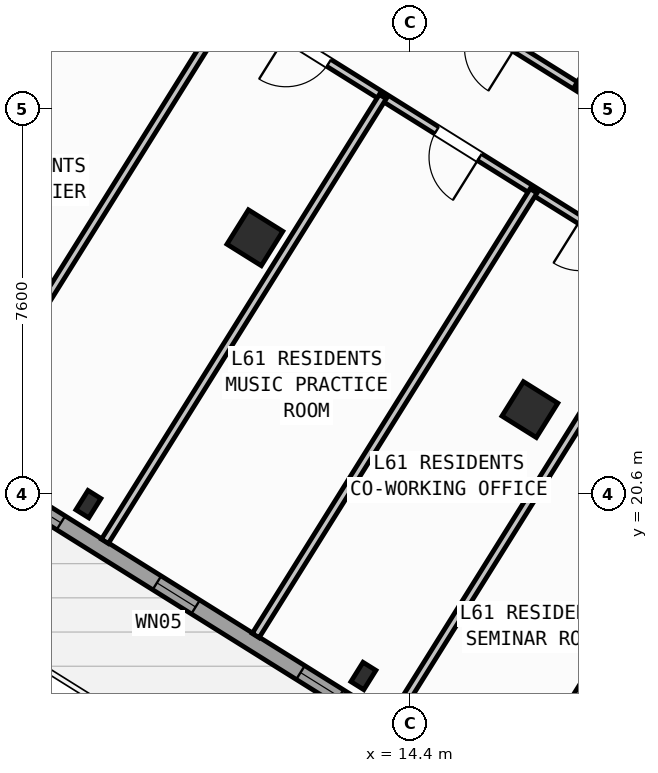
"""IFC4 building model, lengths in metres.
Left out: names, types, materials, properties, quantities, classifications, styles, units other than length and angle.
Written with IfcOpenShell. Run it as: python <this file> out.ifc"""

import sys

from ifc_helpers import new_model, si_unit, direction, frame, frame_2d, origin, origin_2d, place, context, subcontext, project, spatial, rectangle, hollow_rectangle, i_section, extrude, source, transform, mapped, element, fill, save


model = new_model("IFC4")
c1 = context("Model", 3, precision=1e-05, world=origin(), true_north=direction((0.0, 1.0)))
c2 = subcontext(c1, "Body", "Model", "MODEL_VIEW")
j1 = project(units=[si_unit("LENGTHUNIT", "METRE"), si_unit("PLANEANGLEUNIT", "RADIAN")], contexts=[c1])
p1 = place(None, origin())
s1 = spatial("IfcSite", under=j1, at=p1, CompositionType="ELEMENT")
p2 = place(p1, origin())
s2 = spatial("IfcBuilding", under=s1, at=p2, CompositionType="ELEMENT")
p3 = place(p2, frame((0.0, 0.0, 242.1)))
s3 = spatial("IfcBuildingStorey", under=s2, at=p3, CompositionType="ELEMENT", Elevation=242.1)
m1 = source(origin(), c2, "Body", "SweptSolid", [
    extrude(hollow_rectangle(XDim=0.8, YDim=0.8, WallThickness=0.032, at=origin_2d()), origin(), (0.0, 0.0, 1.0), 3.6),
])
p4 = place(p3, frame((16.764, 22.261, 0.0), z_axis=(0.0, 0.0, 1.0), x_axis=(-0.848048096156, 0.529919264233, 0.0)))
e1 = element("IfcColumn", 1, at=p4, inside=s3, PredefinedType="COLUMN", context=c2, shape_type="MappedRepresentation", body=[
    mapped(m1, transform((0.0, 0.0, 0.0), scale=1.0)),
])
m2 = source(origin(), c2, "Body", "SweptSolid", [
    extrude(i_section(OverallWidth=0.3, OverallDepth=0.45, WebThickness=0.014, FlangeThickness=0.026, at=origin_2d()), origin(), (0.0, 0.0, 1.0), 3.6),
])
p5 = place(p3, frame((13.478, 17.003, 0.0), z_axis=(0.0, 0.0, 1.0), x_axis=(-0.848048096156, 0.529919264233, 0.0)))
e2 = element("IfcColumn", 2, at=p5, inside=s3, PredefinedType="COLUMN", context=c2, shape_type="MappedRepresentation", body=[
    mapped(m2, transform((0.0, 0.0, 0.0), scale=1.0)),
])
p6 = place(p3, frame((11.336, 25.653, 0.0), z_axis=(0.0, 0.0, 1.0), x_axis=(-0.848048096156, 0.529919264233, 0.0)))
e3 = element("IfcColumn", 3, at=p6, inside=s3, PredefinedType="COLUMN", context=c2, shape_type="MappedRepresentation", body=[
    mapped(m1, transform((0.0, 0.0, 0.0), scale=1.0)),
])
p7 = place(p3, frame((8.051, 20.395, 0.0), z_axis=(0.0, 0.0, 1.0), x_axis=(-0.848048096156, 0.529919264233, 0.0)))
e4 = element("IfcColumn", 4, at=p7, inside=s3, PredefinedType="COLUMN", context=c2, shape_type="MappedRepresentation", body=[
    mapped(m2, transform((0.0, 0.0, 0.0), scale=1.0)),
])
p8 = place(p3, frame((29.268, 6.429, 0.0), z_axis=(0.0, 0.0, 1.0), x_axis=(-0.848049971435, 0.529916263149, 0.0)))
e5 = element("IfcWall", 5, at=p8, inside=s3, PredefinedType="STANDARD", context=c2, shape_type="SweptSolid", body=[
    extrude(rectangle(XDim=31.588, YDim=0.32, at=frame_2d((15.794, 0.0))), origin(), (0.0, 0.0, 1.0), 3.32),
])
p9 = place(p8, frame((16.235, 0.0, 0.0)))
e6 = element("IfcOpeningElement", 6, at=p9, cuts=e5, PredefinedType="OPENING", context=c2, shape_type="SweptSolid", body=[
    extrude(rectangle(XDim=1.2, YDim=2.15, at=frame_2d((0.6, 1.075))), frame((0.0, 0.17, 0.0), z_axis=(0.0, -1.0, 0.0), x_axis=(1.0, 0.0, 0.0)), (0.0, 0.0, 1.0), 0.34),
])
p10 = place(p8, frame((3.859, 0.0, 0.9)))
e7 = element("IfcOpeningElement", 7, at=p10, cuts=e5, PredefinedType="OPENING", context=c2, shape_type="SweptSolid", body=[
    extrude(rectangle(XDim=1.65, YDim=1.45, at=frame_2d((0.825, 0.725))), frame((0.0, 0.17, 0.0), z_axis=(0.0, -1.0, 0.0), x_axis=(1.0, 0.0, 0.0)), (0.0, 0.0, 1.0), 0.34),
])
p11 = place(p8, frame((10.519, 0.0, 0.9)))
e8 = element("IfcOpeningElement", 8, at=p11, cuts=e5, PredefinedType="OPENING", context=c2, shape_type="SweptSolid", body=[
    extrude(rectangle(XDim=1.65, YDim=1.45, at=frame_2d((0.825, 0.725))), frame((0.0, 0.17, 0.0), z_axis=(0.0, -1.0, 0.0), x_axis=(1.0, 0.0, 0.0)), (0.0, 0.0, 1.0), 0.34),
])
p12 = place(p8, frame((19.182, 0.0, 1.0)))
e9 = element("IfcOpeningElement", 9, at=p12, cuts=e5, PredefinedType="OPENING", context=c2, shape_type="SweptSolid", body=[
    extrude(rectangle(XDim=0.9, YDim=1.25, at=frame_2d((0.45, 0.625))), frame((0.0, 0.17, 0.0), z_axis=(0.0, -1.0, 0.0), x_axis=(1.0, 0.0, 0.0)), (0.0, 0.0, 1.0), 0.34),
])
p13 = place(p8, frame((22.524, 0.0, 1.0)))
e10 = element("IfcOpeningElement", 10, at=p13, cuts=e5, PredefinedType="OPENING", context=c2, shape_type="SweptSolid", body=[
    extrude(rectangle(XDim=0.9, YDim=1.25, at=frame_2d((0.45, 0.625))), frame((0.0, 0.17, 0.0), z_axis=(0.0, -1.0, 0.0), x_axis=(1.0, 0.0, 0.0)), (0.0, 0.0, 1.0), 0.34),
])
p14 = place(p8, frame((25.658, 0.0, 0.9)))
e11 = element("IfcOpeningElement", 11, at=p14, cuts=e5, PredefinedType="OPENING", context=c2, shape_type="SweptSolid", body=[
    extrude(rectangle(XDim=1.65, YDim=1.45, at=frame_2d((0.825, 0.725))), frame((0.0, 0.17, 0.0), z_axis=(0.0, -1.0, 0.0), x_axis=(1.0, 0.0, 0.0)), (0.0, 0.0, 1.0), 0.34),
])
p15 = place(p8, frame((29.278, 0.0, 0.9)))
e12 = element("IfcOpeningElement", 12, at=p15, cuts=e5, PredefinedType="OPENING", context=c2, shape_type="SweptSolid", body=[
    extrude(rectangle(XDim=1.35, YDim=1.45, at=frame_2d((0.675, 0.725))), frame((0.0, 0.17, 0.0), z_axis=(0.0, -1.0, 0.0), x_axis=(1.0, 0.0, 0.0)), (0.0, 0.0, 1.0), 0.34),
])
p16 = place(p3, frame((2.415, 23.452, 0.0), z_axis=(0.0, 0.0, 1.0), x_axis=(0.52991049553, 0.848053575387, 0.0)))
e13 = element("IfcWall", 13, at=p16, inside=s3, PredefinedType="STANDARD", context=c2, shape_type="SweptSolid", body=[
    extrude(rectangle(XDim=21.587, YDim=0.32, at=frame_2d((10.794, 0.0))), origin(), (0.0, 0.0, 1.0), 2.845),
])
p17 = place(p16, frame((2.581, 0.0, 0.9)))
e14 = element("IfcOpeningElement", 14, at=p17, cuts=e13, PredefinedType="OPENING", context=c2, shape_type="SweptSolid", body=[
    extrude(rectangle(XDim=1.65, YDim=1.45, at=frame_2d((0.825, 0.725))), frame((0.0, 0.17, 0.0), z_axis=(0.0, -1.0, 0.0), x_axis=(1.0, 0.0, 0.0)), (0.0, 0.0, 1.0), 0.34),
])
p18 = place(p16, frame((7.879, 0.0, 0.9)))
e15 = element("IfcOpeningElement", 15, at=p18, cuts=e13, PredefinedType="OPENING", context=c2, shape_type="SweptSolid", body=[
    extrude(rectangle(XDim=1.35, YDim=1.45, at=frame_2d((0.675, 0.725))), frame((0.0, 0.17, 0.0), z_axis=(0.0, -1.0, 0.0), x_axis=(1.0, 0.0, 0.0)), (0.0, 0.0, 1.0), 0.34),
])
p19 = place(p16, frame((16.954, 0.0, 0.95)))
e16 = element("IfcOpeningElement", 16, at=p19, cuts=e13, PredefinedType="OPENING", context=c2, shape_type="SweptSolid", body=[
    extrude(rectangle(XDim=1.95, YDim=1.35, at=frame_2d((0.975, 0.675))), frame((0.0, 0.17, 0.0), z_axis=(0.0, -1.0, 0.0), x_axis=(1.0, 0.0, 0.0)), (0.0, 0.0, 1.0), 0.34),
])
p20 = place(p3, frame((14.138, 41.825, 0.0), z_axis=(0.0, 0.0, 1.0), x_axis=(0.848046498049, -0.529921821731, 0.0)))
e17 = element("IfcWall", 17, at=p20, inside=s3, PredefinedType="STANDARD", context=c2, shape_type="SweptSolid", body=[
    extrude(rectangle(XDim=31.588, YDim=0.32, at=frame_2d((15.794, 0.0))), origin(), (0.0, 0.0, 1.0), 3.32),
])
p21 = place(p20, frame((9.712, 0.0, 0.0)))
e18 = element("IfcOpeningElement", 18, at=p21, cuts=e17, PredefinedType="OPENING", context=c2, shape_type="SweptSolid", body=[
    extrude(rectangle(XDim=1.05, YDim=2.15, at=frame_2d((0.525, 1.075))), frame((0.0, 0.17, 0.0), z_axis=(0.0, -1.0, 0.0), x_axis=(1.0, 0.0, 0.0)), (0.0, 0.0, 1.0), 0.34),
])
p22 = place(p20, frame((0.841, 0.0, 0.9)))
e19 = element("IfcOpeningElement", 19, at=p22, cuts=e17, PredefinedType="OPENING", context=c2, shape_type="SweptSolid", body=[
    extrude(rectangle(XDim=1.65, YDim=1.45, at=frame_2d((0.825, 0.725))), frame((0.0, 0.17, 0.0), z_axis=(0.0, -1.0, 0.0), x_axis=(1.0, 0.0, 0.0)), (0.0, 0.0, 1.0), 0.34),
])
p23 = place(p20, frame((4.171, 0.0, 1.0)))
e20 = element("IfcOpeningElement", 20, at=p23, cuts=e17, PredefinedType="OPENING", context=c2, shape_type="SweptSolid", body=[
    extrude(rectangle(XDim=0.9, YDim=1.25, at=frame_2d((0.45, 0.625))), frame((0.0, 0.17, 0.0), z_axis=(0.0, -1.0, 0.0), x_axis=(1.0, 0.0, 0.0)), (0.0, 0.0, 1.0), 0.34),
])
p24 = place(p20, frame((13.624, 0.0, 0.95)))
e21 = element("IfcOpeningElement", 21, at=p24, cuts=e17, PredefinedType="OPENING", context=c2, shape_type="SweptSolid", body=[
    extrude(rectangle(XDim=1.95, YDim=1.35, at=frame_2d((0.975, 0.675))), frame((0.0, 0.17, 0.0), z_axis=(0.0, -1.0, 0.0), x_axis=(1.0, 0.0, 0.0)), (0.0, 0.0, 1.0), 0.34),
])
p25 = place(p20, frame((17.129, 0.0, 1.0)))
e22 = element("IfcOpeningElement", 22, at=p25, cuts=e17, PredefinedType="OPENING", context=c2, shape_type="SweptSolid", body=[
    extrude(rectangle(XDim=0.9, YDim=1.25, at=frame_2d((0.45, 0.625))), frame((0.0, 0.17, 0.0), z_axis=(0.0, -1.0, 0.0), x_axis=(1.0, 0.0, 0.0)), (0.0, 0.0, 1.0), 0.34),
])
p26 = place(p20, frame((21.744, 0.0, 0.9)))
e23 = element("IfcOpeningElement", 23, at=p26, cuts=e17, PredefinedType="OPENING", context=c2, shape_type="SweptSolid", body=[
    extrude(rectangle(XDim=1.65, YDim=1.45, at=frame_2d((0.825, 0.725))), frame((0.0, 0.17, 0.0), z_axis=(0.0, -1.0, 0.0), x_axis=(1.0, 0.0, 0.0)), (0.0, 0.0, 1.0), 0.34),
])
p27 = place(p20, frame((27.394, 0.0, 0.9)))
e24 = element("IfcOpeningElement", 24, at=p27, cuts=e17, PredefinedType="OPENING", context=c2, shape_type="SweptSolid", body=[
    extrude(rectangle(XDim=1.65, YDim=1.45, at=frame_2d((0.825, 0.725))), frame((0.0, 0.17, 0.0), z_axis=(0.0, -1.0, 0.0), x_axis=(1.0, 0.0, 0.0)), (0.0, 0.0, 1.0), 0.34),
])
p28 = place(p3, frame((21.938, 23.391, 0.0), z_axis=(0.0, 0.0, 1.0), x_axis=(-0.529924725692, -0.848044683434, 0.0)))
e25 = element("IfcWall", 25, at=p28, inside=s3, PredefinedType="PARTITIONING", context=c2, shape_type="SweptSolid", body=[
    extrude(rectangle(XDim=10.35, YDim=0.16, at=frame_2d((5.175, 0.0))), origin(), (0.0, 0.0, 1.0), 3.31),
])
p29 = place(p3, frame((23.104, 25.256, 0.0), z_axis=(0.0, 0.0, 1.0), x_axis=(-0.848041752158, 0.529929416617, 0.0)))
e26 = element("IfcWall", 26, at=p29, inside=s3, PredefinedType="PARTITIONING", context=c2, shape_type="SweptSolid", body=[
    extrude(rectangle(XDim=16.73, YDim=0.16, at=frame_2d((8.365, 0.0))), origin(), (0.0, 0.0, 1.0), 3.31),
])
p30 = place(p29, frame((1.395, 0.0, 0.0)))
e27 = element("IfcOpeningElement", 27, at=p30, cuts=e26, PredefinedType="OPENING", context=c2, shape_type="SweptSolid", body=[
    extrude(rectangle(XDim=1.0, YDim=2.1, at=frame_2d((0.5, 1.05))), frame((0.0, 0.09, 0.0), z_axis=(0.0, -1.0, 0.0), x_axis=(1.0, 0.0, 0.0)), (0.0, 0.0, 1.0), 0.18),
])
p31 = place(p29, frame((7.82, 0.0, 0.0)))
e28 = element("IfcOpeningElement", 28, at=p31, cuts=e26, PredefinedType="OPENING", context=c2, shape_type="SweptSolid", body=[
    extrude(rectangle(XDim=1.0, YDim=2.1, at=frame_2d((0.5, 1.05))), frame((0.0, 0.09, 0.0), z_axis=(0.0, -1.0, 0.0), x_axis=(1.0, 0.0, 0.0)), (0.0, 0.0, 1.0), 0.18),
])
p32 = place(p29, frame((11.14, 0.0, 0.0)))
e29 = element("IfcOpeningElement", 29, at=p32, cuts=e26, PredefinedType="OPENING", context=c2, shape_type="SweptSolid", body=[
    extrude(rectangle(XDim=1.0, YDim=2.1, at=frame_2d((0.5, 1.05))), frame((0.0, 0.09, 0.0), z_axis=(0.0, -1.0, 0.0), x_axis=(1.0, 0.0, 0.0)), (0.0, 0.0, 1.0), 0.18),
])
p33 = place(p3, frame((21.938, 23.391, 0.0), z_axis=(0.0, 0.0, 1.0), x_axis=(-0.848045850158, 0.529922858565, 0.0)))
e30 = element("IfcWall", 30, at=p33, inside=s3, PredefinedType="PARTITIONING", context=c2, shape_type="SweptSolid", body=[
    extrude(rectangle(XDim=16.73, YDim=0.16, at=frame_2d((8.365, 0.0))), origin(), (0.0, 0.0, 1.0), 3.31),
])
p34 = place(p33, frame((0.92, 0.0, 0.0)))
e31 = element("IfcOpeningElement", 31, at=p34, cuts=e30, PredefinedType="OPENING", context=c2, shape_type="SweptSolid", body=[
    extrude(rectangle(XDim=1.0, YDim=2.1, at=frame_2d((0.5, 1.05))), frame((0.0, 0.09, 0.0), z_axis=(0.0, -1.0, 0.0), x_axis=(1.0, 0.0, 0.0)), (0.0, 0.0, 1.0), 0.18),
])
p35 = place(p33, frame((3.928, 0.0, 0.0)))
e32 = element("IfcOpeningElement", 32, at=p35, cuts=e30, PredefinedType="OPENING", context=c2, shape_type="SweptSolid", body=[
    extrude(rectangle(XDim=1.0, YDim=2.1, at=frame_2d((0.5, 1.05))), frame((0.0, 0.09, 0.0), z_axis=(0.0, -1.0, 0.0), x_axis=(1.0, 0.0, 0.0)), (0.0, 0.0, 1.0), 0.18),
])
p36 = place(p33, frame((7.271, 0.0, 0.0)))
e33 = element("IfcOpeningElement", 33, at=p36, cuts=e30, PredefinedType="OPENING", context=c2, shape_type="SweptSolid", body=[
    extrude(rectangle(XDim=1.0, YDim=2.1, at=frame_2d((0.5, 1.05))), frame((0.0, 0.09, 0.0), z_axis=(0.0, -1.0, 0.0), x_axis=(1.0, 0.0, 0.0)), (0.0, 0.0, 1.0), 0.18),
])
p37 = place(p33, frame((10.78, 0.0, 0.0)))
e34 = element("IfcOpeningElement", 34, at=p37, cuts=e30, PredefinedType="OPENING", context=c2, shape_type="SweptSolid", body=[
    extrude(rectangle(XDim=1.0, YDim=2.1, at=frame_2d((0.5, 1.05))), frame((0.0, 0.09, 0.0), z_axis=(0.0, -1.0, 0.0), x_axis=(1.0, 0.0, 0.0)), (0.0, 0.0, 1.0), 0.18),
])
p38 = place(p33, frame((14.372, 0.0, 0.0)))
e35 = element("IfcOpeningElement", 35, at=p38, cuts=e30, PredefinedType="OPENING", context=c2, shape_type="SweptSolid", body=[
    extrude(rectangle(XDim=1.0, YDim=2.1, at=frame_2d((0.5, 1.05))), frame((0.0, 0.09, 0.0), z_axis=(0.0, -1.0, 0.0), x_axis=(1.0, 0.0, 0.0)), (0.0, 0.0, 1.0), 0.18),
])
p39 = place(p3, frame((19.529, 24.896, 0.0), z_axis=(0.0, 0.0, 1.0), x_axis=(-0.529914125013, -0.848051307476, 0.0)))
e36 = element("IfcWall", 36, at=p39, inside=s3, PredefinedType="PARTITIONING", context=c2, shape_type="SweptSolid", body=[
    extrude(rectangle(XDim=10.35, YDim=0.16, at=frame_2d((5.175, 0.0))), origin(), (0.0, 0.0, 1.0), 3.31),
])
p40 = place(p3, frame((16.837, 26.579, 0.0), z_axis=(0.0, 0.0, 1.0), x_axis=(-0.529941690036, -0.848034082547, 0.0)))
e37 = element("IfcWall", 37, at=p40, inside=s3, PredefinedType="PARTITIONING", context=c2, shape_type="SweptSolid", body=[
    extrude(rectangle(XDim=10.35, YDim=0.16, at=frame_2d((5.175, 0.0))), origin(), (0.0, 0.0, 1.0), 2.935),
])
p41 = place(p3, frame((13.861, 28.438, 0.0), z_axis=(0.0, 0.0, 1.0), x_axis=(-0.529931089283, -0.848040706931, 0.0)))
e38 = element("IfcWall", 38, at=p41, inside=s3, PredefinedType="PARTITIONING", context=c2, shape_type="SweptSolid", body=[
    extrude(rectangle(XDim=10.35, YDim=0.16, at=frame_2d((5.175, 0.0))), origin(), (0.0, 0.0, 1.0), 3.31),
])
p42 = place(p3, frame((10.885, 30.298, 0.0), z_axis=(0.0, 0.0, 1.0), x_axis=(-0.529924725692, -0.848044683434, 0.0)))
e39 = element("IfcWall", 39, at=p42, inside=s3, PredefinedType="PARTITIONING", context=c2, shape_type="SweptSolid", body=[
    extrude(rectangle(XDim=10.35, YDim=0.16, at=frame_2d((5.175, 0.0))), origin(), (0.0, 0.0, 1.0), 3.31),
])
p43 = place(p3, frame((19.616, 31.657, 0.0), z_axis=(0.0, 0.0, 1.0), x_axis=(-0.529876336437, -0.84807491891, 0.0)))
e40 = element("IfcWall", 40, at=p43, inside=s3, PredefinedType="PLUMBINGWALL", context=c2, shape_type="SweptSolid", body=[
    extrude(rectangle(XDim=3.58, YDim=0.14, at=frame_2d((1.79, 0.0))), origin(), (0.0, 0.0, 1.0), 3.31),
])
p44 = place(p43, frame((1.4, 0.0, 0.0)))
e41 = element("IfcOpeningElement", 41, at=p44, cuts=e40, PredefinedType="OPENING", context=c2, shape_type="SweptSolid", body=[
    extrude(rectangle(XDim=0.78, YDim=2.05, at=frame_2d((0.39, 1.025))), frame((0.0, 0.08, 0.0), z_axis=(0.0, -1.0, 0.0), x_axis=(1.0, 0.0, 0.0)), (0.0, 0.0, 1.0), 0.16),
])
m3 = source(origin(), c2, "Body", "SweptSolid", [
    extrude(rectangle(XDim=0.9, YDim=1.25, at=frame_2d((0.45, 0.625))), frame((0.0, 0.03, 0.0), z_axis=(0.0, -1.0, 0.0), x_axis=(1.0, 0.0, 0.0)), (0.0, 0.0, 1.0), 0.06),
])
p45 = place(p12, origin())
e42 = element("IfcWindow", 42, at=p45, inside=s3, PartitioningType="SINGLE_PANEL", PredefinedType="WINDOW", context=c2, shape_type="MappedRepresentation", body=[
    mapped(m3, transform((0.0, 0.0, 0.0), scale=1.0)),
])
fill(e9, e42)
p46 = place(p13, origin())
e43 = element("IfcWindow", 43, at=p46, inside=s3, PartitioningType="SINGLE_PANEL", PredefinedType="WINDOW", context=c2, shape_type="MappedRepresentation", body=[
    mapped(m3, transform((0.0, 0.0, 0.0), scale=1.0)),
])
fill(e10, e43)
m4 = source(origin(), c2, "Body", "SweptSolid", [
    extrude(rectangle(XDim=1.65, YDim=1.45, at=frame_2d((0.825, 0.725))), frame((0.0, 0.03, 0.0), z_axis=(0.0, -1.0, 0.0), x_axis=(1.0, 0.0, 0.0)), (0.0, 0.0, 1.0), 0.06),
])
p47 = place(p14, origin())
e44 = element("IfcWindow", 44, at=p47, inside=s3, PartitioningType="SINGLE_PANEL", PredefinedType="WINDOW", context=c2, shape_type="MappedRepresentation", body=[
    mapped(m4, transform((0.0, 0.0, 0.0), scale=1.0)),
])
fill(e11, e44)
m5 = source(origin(), c2, "Body", "SweptSolid", [
    extrude(rectangle(XDim=1.0, YDim=2.1, at=frame_2d((0.5, 1.05))), frame((0.0, 0.025, 0.0), z_axis=(0.0, -1.0, 0.0), x_axis=(1.0, 0.0, 0.0)), (0.0, 0.0, 1.0), 0.05),
])
p48 = place(p36, origin())
e45 = element("IfcDoor", 45, at=p48, inside=s3, OperationType="SINGLE_SWING_LEFT", PredefinedType="DOOR", context=c2, shape_type="MappedRepresentation", body=[
    mapped(m5, transform((0.0, 0.0, 0.0), scale=1.0)),
])
fill(e33, e45)
p49 = place(p37, origin())
e46 = element("IfcDoor", 46, at=p49, inside=s3, OperationType="SINGLE_SWING_RIGHT", PredefinedType="DOOR", context=c2, shape_type="MappedRepresentation", body=[
    mapped(m5, transform((0.0, 0.0, 0.0), scale=1.0)),
])
fill(e34, e46)
save(model, sys.argv[1])
